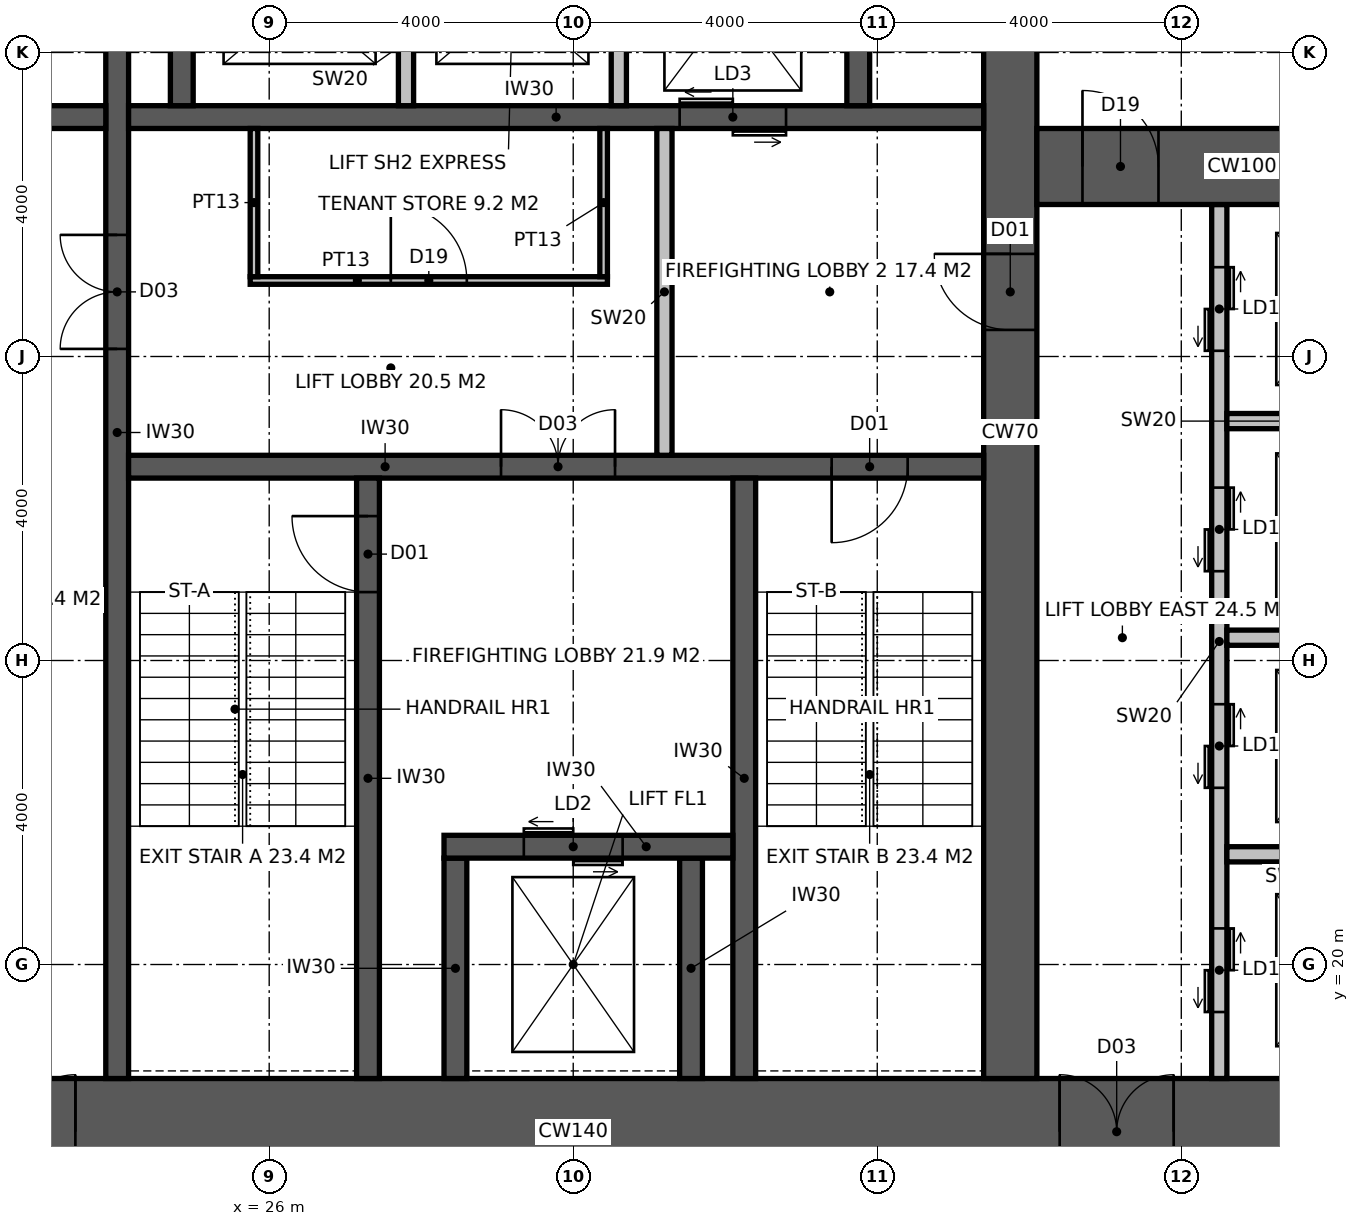
"""IFC4 building model, lengths in metres.
Left out: names, types, materials, properties, quantities, classifications, styles, units other than length and angle.
Written with IfcOpenShell. Run it as: python <this file> out.ifc"""

import sys

from ifc_helpers import new_model, si_unit, direction, frame, frame_2d, origin, place, context, subcontext, project, spatial, rectangle, extrude, element, fill, save


model = new_model("IFC4")
c1 = context("Model", 3, precision=1e-05, world=origin(), true_north=direction((0.0, 1.0)))
c2 = subcontext(c1, "Body", "Model", "MODEL_VIEW")
j1 = project(units=[si_unit("LENGTHUNIT", "METRE"), si_unit("PLANEANGLEUNIT", "RADIAN")], contexts=[c1])
p1 = place(None, origin())
s1 = spatial("IfcSite", under=j1, at=p1, CompositionType="ELEMENT")
p2 = place(p1, origin())
s2 = spatial("IfcBuilding", under=s1, at=p2, CompositionType="ELEMENT")
p3 = place(p2, frame((0.0, 0.0, 15.0)))
s3 = spatial("IfcBuildingStorey", under=s2, at=p3, CompositionType="ELEMENT", Elevation=15.0)
p4 = place(p3, frame((18.5, 17.8, -0.15), z_axis=(0.0, 0.0, 1.0), x_axis=(1.0, 0.0, 0.0)))
e1 = element("IfcWall", 1, at=p4, inside=s3, PredefinedType="SHEAR", context=c2, shape_type="SweptSolid", body=[
    extrude(rectangle(XDim=23.0, YDim=1.4, at=frame_2d((11.5, 0.0))), origin(), (0.0, 0.0, 1.0), 4.0),
])
p5 = place(p4, frame((3.45, 0.0, 0.15)))
e2 = element("IfcOpeningElement", 2, at=p5, cuts=e1, PredefinedType="OPENING", context=c2, shape_type="SweptSolid", body=[
    extrude(rectangle(XDim=1.5, YDim=2.4, at=frame_2d((0.75, 1.2))), frame((0.0, 0.71, 0.0), z_axis=(0.0, -1.0, 0.0), x_axis=(1.0, 0.0, 0.0)), (0.0, 0.0, 1.0), 1.42),
])
p6 = place(p4, frame((17.9, 0.0, 0.15)))
e3 = element("IfcOpeningElement", 3, at=p6, cuts=e1, PredefinedType="OPENING", context=c2, shape_type="SweptSolid", body=[
    extrude(rectangle(XDim=1.5, YDim=2.4, at=frame_2d((0.75, 1.2))), frame((0.0, 0.71, 0.0), z_axis=(0.0, -1.0, 0.0), x_axis=(1.0, 0.0, 0.0)), (0.0, 0.0, 1.0), 1.42),
])
p7 = place(p4, frame((0.9, 0.0, 0.15)))
e4 = element("IfcOpeningElement", 4, at=p7, cuts=e1, PredefinedType="OPENING", context=c2, shape_type="SweptSolid", body=[
    extrude(rectangle(XDim=1.0, YDim=2.2, at=frame_2d((0.5, 1.1))), frame((0.0, 0.71, 0.0), z_axis=(0.0, -1.0, 0.0), x_axis=(1.0, 0.0, 0.0)), (0.0, 0.0, 1.0), 1.42),
])
p8 = place(p3, frame((35.75, 18.5, -0.15), z_axis=(0.0, 0.0, 1.0), x_axis=(0.0, 1.0, 0.0)))
e5 = element("IfcWall", 5, at=p8, inside=s3, PredefinedType="SHEAR", context=c2, shape_type="SweptSolid", body=[
    extrude(rectangle(XDim=17.0, YDim=0.7, at=frame_2d((8.5, 0.0))), origin(), (0.0, 0.0, 1.0), 4.0),
])
p9 = place(p8, frame((9.85, 0.0, 0.15)))
e6 = element("IfcOpeningElement", 6, at=p9, cuts=e5, PredefinedType="OPENING", context=c2, shape_type="SweptSolid", body=[
    extrude(rectangle(XDim=1.0, YDim=2.2, at=frame_2d((0.5, 1.1))), frame((0.0, 0.36, 0.0), z_axis=(0.0, -1.0, 0.0), x_axis=(1.0, 0.0, 0.0)), (0.0, 0.0, 1.0), 0.72),
])
p10 = place(p3, frame((24.0, 18.5, -0.15), z_axis=(0.0, 0.0, 1.0), x_axis=(0.0, 1.0, 0.0)))
e7 = element("IfcWall", 7, at=p10, inside=s3, PredefinedType="SHEAR", context=c2, shape_type="SweptSolid", body=[
    extrude(rectangle(XDim=17.0, YDim=0.3, at=frame_2d((8.5, 0.0))), origin(), (0.0, 0.0, 1.0), 4.0),
])
p11 = place(p10, frame((9.6, 0.0, 0.15)))
e8 = element("IfcOpeningElement", 8, at=p11, cuts=e7, PredefinedType="OPENING", context=c2, shape_type="SweptSolid", body=[
    extrude(rectangle(XDim=1.5, YDim=2.4, at=frame_2d((0.75, 1.2))), frame((0.0, 0.16, 0.0), z_axis=(0.0, -1.0, 0.0), x_axis=(1.0, 0.0, 0.0)), (0.0, 0.0, 1.0), 0.32),
])
p12 = place(p3, frame((24.15, 26.55, -0.15), z_axis=(0.0, 0.0, 1.0), x_axis=(1.0, 0.0, 0.0)))
e9 = element("IfcWall", 9, at=p12, inside=s3, PredefinedType="SHEAR", context=c2, shape_type="SweptSolid", body=[
    extrude(rectangle(XDim=11.25, YDim=0.3, at=frame_2d((5.625, 0.0))), origin(), (0.0, 0.0, 1.0), 4.0),
])
p13 = place(p12, frame((9.25, 0.0, 0.15)))
e10 = element("IfcOpeningElement", 10, at=p13, cuts=e9, PredefinedType="OPENING", context=c2, shape_type="SweptSolid", body=[
    extrude(rectangle(XDim=1.0, YDim=2.2, at=frame_2d((0.5, 1.1))), frame((0.0, 0.16, 0.0), z_axis=(0.0, -1.0, 0.0), x_axis=(1.0, 0.0, 0.0)), (0.0, 0.0, 1.0), 0.32),
])
p14 = place(p12, frame((4.9, 0.0, 0.15)))
e11 = element("IfcOpeningElement", 11, at=p14, cuts=e9, PredefinedType="OPENING", context=c2, shape_type="SweptSolid", body=[
    extrude(rectangle(XDim=1.5, YDim=2.4, at=frame_2d((0.75, 1.2))), frame((0.0, 0.16, 0.0), z_axis=(0.0, -1.0, 0.0), x_axis=(1.0, 0.0, 0.0)), (0.0, 0.0, 1.0), 0.32),
])
p15 = place(p3, frame((27.3, 18.5, -0.15), z_axis=(0.0, 0.0, 1.0), x_axis=(0.0, 1.0, 0.0)))
e12 = element("IfcWall", 12, at=p15, inside=s3, PredefinedType="SHEAR", context=c2, shape_type="SweptSolid", body=[
    extrude(rectangle(XDim=7.9, YDim=0.3, at=frame_2d((3.95, 0.0))), origin(), (0.0, 0.0, 1.0), 4.0),
])
p16 = place(p15, frame((6.4, 0.0, 0.15)))
e13 = element("IfcOpeningElement", 13, at=p16, cuts=e12, PredefinedType="OPENING", context=c2, shape_type="SweptSolid", body=[
    extrude(rectangle(XDim=1.0, YDim=2.2, at=frame_2d((0.5, 1.1))), frame((0.0, 0.16, 0.0), z_axis=(0.0, -1.0, 0.0), x_axis=(1.0, 0.0, 0.0)), (0.0, 0.0, 1.0), 0.32),
])
p17 = place(p3, frame((32.25, 18.5, -0.15), z_axis=(0.0, 0.0, 1.0), x_axis=(0.0, 1.0, 0.0)))
e14 = element("IfcWall", 14, at=p17, inside=s3, PredefinedType="SHEAR", context=c2, shape_type="SweptSolid", body=[
    extrude(rectangle(XDim=7.9, YDim=0.3, at=frame_2d((3.95, 0.0))), origin(), (0.0, 0.0, 1.0), 4.0),
])
for number, where, z_axis, x_axis in (
    (15, (28.45, 18.5, -0.15), (0.0, 0.0, 1.0), (0.0, 1.0, 0.0)),
    (16, (31.55, 18.5, -0.15), (0.0, 0.0, 1.0), (0.0, 1.0, 0.0)),
):
    element("IfcWall", number, at=place(p3, frame(where, z_axis=z_axis, x_axis=x_axis)), inside=s3, PredefinedType="SHEAR", context=c2, shape_type="SweptSolid", body=[
        extrude(rectangle(XDim=2.9, YDim=0.3, at=frame_2d((1.45, 0.0))), origin(), (0.0, 0.0, 1.0), 4.0),
    ])
p18 = place(p3, frame((28.3, 21.55, -0.15), z_axis=(0.0, 0.0, 1.0), x_axis=(1.0, 0.0, 0.0)))
e17 = element("IfcWall", 17, at=p18, inside=s3, PredefinedType="SHEAR", context=c2, shape_type="SweptSolid", body=[
    extrude(rectangle(XDim=3.8, YDim=0.3, at=frame_2d((1.9, 0.0))), origin(), (0.0, 0.0, 1.0), 4.0),
])
p19 = place(p18, frame((1.05, 0.0, 0.15)))
e18 = element("IfcOpeningElement", 18, at=p19, cuts=e17, PredefinedType="OPENING", context=c2, shape_type="SweptSolid", body=[
    extrude(rectangle(XDim=1.3, YDim=2.4, at=frame_2d((0.65, 1.2))), frame((0.0, 0.16, 0.0), z_axis=(0.0, -1.0, 0.0), x_axis=(1.0, 0.0, 0.0)), (0.0, 0.0, 1.0), 0.32),
])
p20 = place(p3, frame((24.15, 31.15, -0.15), z_axis=(0.0, 0.0, 1.0), x_axis=(1.0, 0.0, 0.0)))
e19 = element("IfcWall", 19, at=p20, inside=s3, PredefinedType="SHEAR", context=c2, shape_type="SweptSolid", body=[
    extrude(rectangle(XDim=11.25, YDim=0.3, at=frame_2d((5.625, 0.0))), origin(), (0.0, 0.0, 1.0), 4.0),
])
p21 = place(p20, frame((7.25, 0.0, 0.15)))
e20 = element("IfcOpeningElement", 20, at=p21, cuts=e19, PredefinedType="OPENING", context=c2, shape_type="SweptSolid", body=[
    extrude(rectangle(XDim=1.4, YDim=2.4, at=frame_2d((0.7, 1.2))), frame((0.0, 0.16, 0.0), z_axis=(0.0, -1.0, 0.0), x_axis=(1.0, 0.0, 0.0)), (0.0, 0.0, 1.0), 0.32),
])
p22 = place(p3, frame((18.5, 31.15, -0.15), z_axis=(0.0, 0.0, 1.0), x_axis=(1.0, 0.0, 0.0)))
e21 = element("IfcWall", 21, at=p22, inside=s3, PredefinedType="SHEAR", context=c2, shape_type="SweptSolid", body=[
    extrude(rectangle(XDim=5.35, YDim=0.3, at=frame_2d((2.675, 0.0))), origin(), (0.0, 0.0, 1.0), 4.0),
])
p23 = place(p22, frame((3.4, 0.0, 0.15)))
e22 = element("IfcOpeningElement", 22, at=p23, cuts=e21, PredefinedType="OPENING", context=c2, shape_type="SweptSolid", body=[
    extrude(rectangle(XDim=1.0, YDim=2.2, at=frame_2d((0.5, 1.1))), frame((0.0, 0.16, 0.0), z_axis=(0.0, -1.0, 0.0), x_axis=(1.0, 0.0, 0.0)), (0.0, 0.0, 1.0), 0.32),
])
for number, where, z_axis, x_axis in (
    (23, (24.85, 31.3, -0.15), (0.0, 0.0, 1.0), (0.0, 1.0, 0.0)),
    (24, (33.75, 31.3, -0.15), (0.0, 0.0, 1.0), (0.0, 1.0, 0.0)),
):
    element("IfcWall", number, at=place(p3, frame(where, z_axis=z_axis, x_axis=x_axis)), inside=s3, PredefinedType="SHEAR", context=c2, shape_type="SweptSolid", body=[
        extrude(rectangle(XDim=4.2, YDim=0.3, at=frame_2d((2.1, 0.0))), origin(), (0.0, 0.0, 1.0), 4.0),
    ])
for number, where, z_axis, x_axis in (
    (25, (27.8, 31.3, -0.15), (0.0, 0.0, 1.0), (0.0, 1.0, 0.0)),
    (26, (30.6, 31.3, -0.15), (0.0, 0.0, 1.0), (0.0, 1.0, 0.0)),
):
    element("IfcWall", number, at=place(p3, frame(where, z_axis=z_axis, x_axis=x_axis)), inside=s3, PredefinedType="SOLIDWALL", context=c2, shape_type="SweptSolid", body=[
        extrude(rectangle(XDim=2.8, YDim=0.2, at=frame_2d((1.4, 0.0))), origin(), (0.0, 0.0, 1.0), 4.0),
    ])
p24 = place(p3, frame((38.5, 18.5, -0.15), z_axis=(0.0, 0.0, 1.0), x_axis=(0.0, 1.0, 0.0)))
e27 = element("IfcWall", 27, at=p24, inside=s3, PredefinedType="SOLIDWALL", context=c2, shape_type="SweptSolid", body=[
    extrude(rectangle(XDim=11.5, YDim=0.2, at=frame_2d((5.75, 0.0))), origin(), (0.0, 0.0, 1.0), 4.0),
])
p25 = place(p24, frame((0.875, 0.0, 0.15)))
e28 = element("IfcOpeningElement", 28, at=p25, cuts=e27, PredefinedType="OPENING", context=c2, shape_type="SweptSolid", body=[
    extrude(rectangle(XDim=1.1, YDim=2.2, at=frame_2d((0.55, 1.1))), frame((0.0, 0.11, 0.0), z_axis=(0.0, -1.0, 0.0), x_axis=(1.0, 0.0, 0.0)), (0.0, 0.0, 1.0), 0.22),
])
p26 = place(p24, frame((3.825, 0.0, 0.15)))
e29 = element("IfcOpeningElement", 29, at=p26, cuts=e27, PredefinedType="OPENING", context=c2, shape_type="SweptSolid", body=[
    extrude(rectangle(XDim=1.1, YDim=2.2, at=frame_2d((0.55, 1.1))), frame((0.0, 0.11, 0.0), z_axis=(0.0, -1.0, 0.0), x_axis=(1.0, 0.0, 0.0)), (0.0, 0.0, 1.0), 0.22),
])
p27 = place(p24, frame((6.675, 0.0, 0.15)))
e30 = element("IfcOpeningElement", 30, at=p27, cuts=e27, PredefinedType="OPENING", context=c2, shape_type="SweptSolid", body=[
    extrude(rectangle(XDim=1.1, YDim=2.2, at=frame_2d((0.55, 1.1))), frame((0.0, 0.11, 0.0), z_axis=(0.0, -1.0, 0.0), x_axis=(1.0, 0.0, 0.0)), (0.0, 0.0, 1.0), 0.22),
])
p28 = place(p24, frame((9.575, 0.0, 0.15)))
e31 = element("IfcOpeningElement", 31, at=p28, cuts=e27, PredefinedType="OPENING", context=c2, shape_type="SweptSolid", body=[
    extrude(rectangle(XDim=1.1, YDim=2.2, at=frame_2d((0.55, 1.1))), frame((0.0, 0.11, 0.0), z_axis=(0.0, -1.0, 0.0), x_axis=(1.0, 0.0, 0.0)), (0.0, 0.0, 1.0), 0.22),
])
p29 = place(p3, frame((36.1, 30.5, -0.15), z_axis=(0.0, 0.0, 1.0), x_axis=(1.0, 0.0, 0.0)))
e32 = element("IfcWall", 32, at=p29, inside=s3, PredefinedType="SHEAR", context=c2, shape_type="SweptSolid", body=[
    extrude(rectangle(XDim=5.4, YDim=1.0, at=frame_2d((2.7, 0.0))), origin(), (0.0, 0.0, 1.0), 4.0),
])
p30 = place(p29, frame((0.6, 0.0, 0.15)))
e33 = element("IfcOpeningElement", 33, at=p30, cuts=e32, PredefinedType="OPENING", context=c2, shape_type="SweptSolid", body=[
    extrude(rectangle(XDim=1.0, YDim=2.2, at=frame_2d((0.5, 1.1))), frame((0.0, 0.51, 0.0), z_axis=(0.0, -1.0, 0.0), x_axis=(1.0, 0.0, 0.0)), (0.0, 0.0, 1.0), 1.02),
])
for number, where, z_axis, x_axis in (
    (34, (38.6, 21.45, -0.15), (0.0, 0.0, 1.0), (1.0, 0.0, 0.0)),
    (35, (38.6, 24.3, -0.15), (0.0, 0.0, 1.0), (1.0, 0.0, 0.0)),
    (36, (38.6, 27.15, -0.15), (0.0, 0.0, 1.0), (1.0, 0.0, 0.0)),
):
    element("IfcWall", number, at=place(p3, frame(where, z_axis=z_axis, x_axis=x_axis)), inside=s3, PredefinedType="SOLIDWALL", context=c2, shape_type="SweptSolid", body=[
        extrude(rectangle(XDim=2.9, YDim=0.2, at=frame_2d((1.45, 0.0))), origin(), (0.0, 0.0, 1.0), 4.0),
    ])
p31 = place(p3, frame((31.2, 26.7, 0.0), z_axis=(0.0, 0.0, 1.0), x_axis=(0.0, 1.0, 0.0)))
e37 = element("IfcWall", 37, at=p31, inside=s3, PredefinedType="SOLIDWALL", context=c2, shape_type="SweptSolid", body=[
    extrude(rectangle(XDim=4.3, YDim=0.2, at=frame_2d((2.15, 0.0))), origin(), (0.0, 0.0, 1.0), 3.85),
])
p32 = place(p3, frame((25.75, 29.0, 0.0), z_axis=(0.0, 0.0, 1.0), x_axis=(1.0, 0.0, 0.0)))
e38 = element("IfcWall", 38, at=p32, inside=s3, PredefinedType="PARTITIONING", context=c2, shape_type="SweptSolid", body=[
    extrude(rectangle(XDim=4.7, YDim=0.1, at=frame_2d((2.35, 0.0))), origin(), (0.0, 0.0, 1.0), 3.85),
])
p33 = place(p32, frame((1.85, 0.0, 0.0)))
e39 = element("IfcOpeningElement", 39, at=p33, cuts=e38, PredefinedType="OPENING", context=c2, shape_type="SweptSolid", body=[
    extrude(rectangle(XDim=1.0, YDim=2.2, at=frame_2d((0.5, 1.1))), frame((0.0, 0.06, 0.0), z_axis=(0.0, -1.0, 0.0), x_axis=(1.0, 0.0, 0.0)), (0.0, 0.0, 1.0), 0.12),
])
for number, where, z_axis, x_axis in (
    (40, (25.8, 29.05, 0.0), (0.0, 0.0, 1.0), (0.0, 1.0, 0.0)),
    (41, (30.4, 29.05, 0.0), (0.0, 0.0, 1.0), (0.0, 1.0, 0.0)),
):
    element("IfcWall", number, at=place(p3, frame(where, z_axis=z_axis, x_axis=x_axis)), inside=s3, PredefinedType="PARTITIONING", context=c2, shape_type="SweptSolid", body=[
        extrude(rectangle(XDim=1.95, YDim=0.1, at=frame_2d((0.975, 0.0))), origin(), (0.0, 0.0, 1.0), 3.85),
    ])
p34 = place(p16, origin())
e42 = element("IfcDoor", 42, at=p34, inside=s3, OperationType="SINGLE_SWING_RIGHT", PredefinedType="DOOR", context=c2, shape_type="SweptSolid", body=[
    extrude(rectangle(XDim=1.0, YDim=2.2, at=frame_2d((0.5, 1.1))), frame((0.0, 0.025, 0.0), z_axis=(0.0, -1.0, 0.0), x_axis=(1.0, 0.0, 0.0)), (0.0, 0.0, 1.0), 0.05),
])
fill(e13, e42)
p35 = place(p13, frame((1.0, 0.0, 0.0), z_axis=(0.0, 0.0, 1.0), x_axis=(-1.0, 0.0, 0.0)))
e43 = element("IfcDoor", 43, at=p35, inside=s3, OperationType="SINGLE_SWING_RIGHT", PredefinedType="DOOR", context=c2, shape_type="SweptSolid", body=[
    extrude(rectangle(XDim=1.0, YDim=2.2, at=frame_2d((0.5, 1.1))), frame((0.0, 0.025, 0.0), z_axis=(0.0, -1.0, 0.0), x_axis=(1.0, 0.0, 0.0)), (0.0, 0.0, 1.0), 0.05),
])
fill(e10, e43)
p36 = place(p9, origin())
e44 = element("IfcDoor", 44, at=p36, inside=s3, OperationType="SINGLE_SWING_RIGHT", PredefinedType="DOOR", context=c2, shape_type="SweptSolid", body=[
    extrude(rectangle(XDim=1.0, YDim=2.2, at=frame_2d((0.5, 1.1))), frame((0.0, 0.025, 0.0), z_axis=(0.0, -1.0, 0.0), x_axis=(1.0, 0.0, 0.0)), (0.0, 0.0, 1.0), 0.05),
])
fill(e6, e44)
p37 = place(p14, origin())
e45 = element("IfcDoor", 45, at=p37, inside=s3, OperationType="DOUBLE_DOOR_DOUBLE_SWING", PredefinedType="DOOR", context=c2, shape_type="SweptSolid", body=[
    extrude(rectangle(XDim=1.5, YDim=2.4, at=frame_2d((0.75, 1.2))), frame((0.0, 0.025, 0.0), z_axis=(0.0, -1.0, 0.0), x_axis=(1.0, 0.0, 0.0)), (0.0, 0.0, 1.0), 0.05),
])
fill(e11, e45)
p38 = place(p11, origin())
e46 = element("IfcDoor", 46, at=p38, inside=s3, OperationType="DOUBLE_DOOR_DOUBLE_SWING", PredefinedType="DOOR", context=c2, shape_type="SweptSolid", body=[
    extrude(rectangle(XDim=1.5, YDim=2.4, at=frame_2d((0.75, 1.2))), frame((0.0, 0.025, 0.0), z_axis=(0.0, -1.0, 0.0), x_axis=(1.0, 0.0, 0.0)), (0.0, 0.0, 1.0), 0.05),
])
fill(e8, e46)
p39 = place(p33, origin())
e47 = element("IfcDoor", 47, at=p39, inside=s3, OperationType="SINGLE_SWING_LEFT", PredefinedType="DOOR", context=c2, shape_type="SweptSolid", body=[
    extrude(rectangle(XDim=1.0, YDim=2.2, at=frame_2d((0.5, 1.1))), frame((0.0, 0.025, 0.0), z_axis=(0.0, -1.0, 0.0), x_axis=(1.0, 0.0, 0.0)), (0.0, 0.0, 1.0), 0.05),
])
fill(e39, e47)
p40 = place(p5, origin())
e48 = element("IfcDoor", 48, at=p40, inside=s3, OperationType="DOUBLE_DOOR_DOUBLE_SWING", PredefinedType="DOOR", context=c2, shape_type="SweptSolid", body=[
    extrude(rectangle(XDim=1.5, YDim=2.4, at=frame_2d((0.75, 1.2))), frame((0.0, 0.025, 0.0), z_axis=(0.0, -1.0, 0.0), x_axis=(1.0, 0.0, 0.0)), (0.0, 0.0, 1.0), 0.05),
])
fill(e2, e48)
p41 = place(p6, origin())
e49 = element("IfcDoor", 49, at=p41, inside=s3, OperationType="DOUBLE_DOOR_DOUBLE_SWING", PredefinedType="DOOR", context=c2, shape_type="SweptSolid", body=[
    extrude(rectangle(XDim=1.5, YDim=2.4, at=frame_2d((0.75, 1.2))), frame((0.0, 0.025, 0.0), z_axis=(0.0, -1.0, 0.0), x_axis=(1.0, 0.0, 0.0)), (0.0, 0.0, 1.0), 0.05),
])
fill(e3, e49)
p42 = place(p30, origin())
e50 = element("IfcDoor", 50, at=p42, inside=s3, OperationType="SINGLE_SWING_LEFT", PredefinedType="DOOR", context=c2, shape_type="SweptSolid", body=[
    extrude(rectangle(XDim=1.0, YDim=2.2, at=frame_2d((0.5, 1.1))), frame((0.0, 0.025, 0.0), z_axis=(0.0, -1.0, 0.0), x_axis=(1.0, 0.0, 0.0)), (0.0, 0.0, 1.0), 0.05),
])
fill(e33, e50)
p43 = place(p19, origin())
e51 = element("IfcDoor", 51, at=p43, inside=s3, OperationType="DOUBLE_DOOR_SLIDING", PredefinedType="DOOR", context=c2, shape_type="SweptSolid", body=[
    extrude(rectangle(XDim=1.3, YDim=2.4, at=frame_2d((0.65, 1.2))), frame((0.0, 0.025, 0.0), z_axis=(0.0, -1.0, 0.0), x_axis=(1.0, 0.0, 0.0)), (0.0, 0.0, 1.0), 0.05),
])
fill(e18, e51)
p44 = place(p21, origin())
e52 = element("IfcDoor", 52, at=p44, inside=s3, OperationType="DOUBLE_DOOR_SLIDING", PredefinedType="DOOR", context=c2, shape_type="SweptSolid", body=[
    extrude(rectangle(XDim=1.4, YDim=2.4, at=frame_2d((0.7, 1.2))), frame((0.0, 0.025, 0.0), z_axis=(0.0, -1.0, 0.0), x_axis=(1.0, 0.0, 0.0)), (0.0, 0.0, 1.0), 0.05),
])
fill(e20, e52)
p45 = place(p25, origin())
e53 = element("IfcDoor", 53, at=p45, inside=s3, OperationType="DOUBLE_DOOR_SLIDING", PredefinedType="DOOR", context=c2, shape_type="SweptSolid", body=[
    extrude(rectangle(XDim=1.1, YDim=2.2, at=frame_2d((0.55, 1.1))), frame((0.0, 0.025, 0.0), z_axis=(0.0, -1.0, 0.0), x_axis=(1.0, 0.0, 0.0)), (0.0, 0.0, 1.0), 0.05),
])
fill(e28, e53)
p46 = place(p26, origin())
e54 = element("IfcDoor", 54, at=p46, inside=s3, OperationType="DOUBLE_DOOR_SLIDING", PredefinedType="DOOR", context=c2, shape_type="SweptSolid", body=[
    extrude(rectangle(XDim=1.1, YDim=2.2, at=frame_2d((0.55, 1.1))), frame((0.0, 0.025, 0.0), z_axis=(0.0, -1.0, 0.0), x_axis=(1.0, 0.0, 0.0)), (0.0, 0.0, 1.0), 0.05),
])
fill(e29, e54)
p47 = place(p27, origin())
e55 = element("IfcDoor", 55, at=p47, inside=s3, OperationType="DOUBLE_DOOR_SLIDING", PredefinedType="DOOR", context=c2, shape_type="SweptSolid", body=[
    extrude(rectangle(XDim=1.1, YDim=2.2, at=frame_2d((0.55, 1.1))), frame((0.0, 0.025, 0.0), z_axis=(0.0, -1.0, 0.0), x_axis=(1.0, 0.0, 0.0)), (0.0, 0.0, 1.0), 0.05),
])
fill(e30, e55)
p48 = place(p28, origin())
e56 = element("IfcDoor", 56, at=p48, inside=s3, OperationType="DOUBLE_DOOR_SLIDING", PredefinedType="DOOR", context=c2, shape_type="SweptSolid", body=[
    extrude(rectangle(XDim=1.1, YDim=2.2, at=frame_2d((0.55, 1.1))), frame((0.0, 0.025, 0.0), z_axis=(0.0, -1.0, 0.0), x_axis=(1.0, 0.0, 0.0)), (0.0, 0.0, 1.0), 0.05),
])
fill(e31, e56)
save(model, sys.argv[1])
